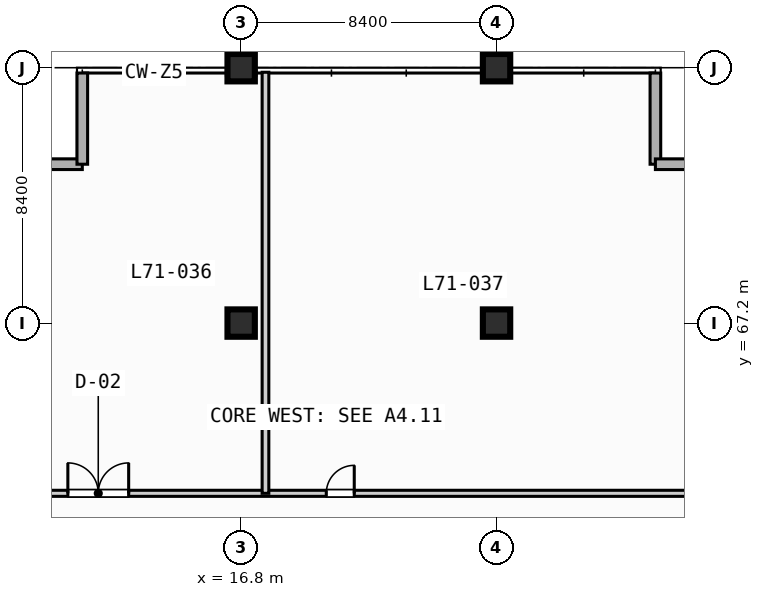
"""IFC4 building model, lengths in metres.
Left out: names, types, materials, properties, quantities, classifications, styles, units other than length and angle.
Written with IfcOpenShell. Run it as: python <this file> out.ifc"""

import sys

from ifc_helpers import new_model, si_unit, direction, frame, frame_2d, origin, origin_2d, place, context, subcontext, project, spatial, rectangle, extrude, element, fill, save


model = new_model("IFC4")
c1 = context("Model", 3, precision=1e-05, world=origin(), true_north=direction((0.0, 1.0)))
c2 = subcontext(c1, "Body", "Model", "MODEL_VIEW")
j1 = project(units=[si_unit("LENGTHUNIT", "METRE"), si_unit("PLANEANGLEUNIT", "RADIAN")], contexts=[c1])
p1 = place(None, origin())
s1 = spatial("IfcSite", under=j1, at=p1, CompositionType="ELEMENT")
p2 = place(p1, origin())
s2 = spatial("IfcBuilding", under=s1, at=p2, CompositionType="ELEMENT")
p3 = place(p2, frame((0.0, 0.0, 286.0)))
s3 = spatial("IfcBuildingStorey", under=s2, at=p3, CompositionType="ELEMENT", Elevation=286.0)
for number, where, z_axis, x_axis in (
    (1, (16.8, 67.2, 0.0), (0.0, 0.0, 1.0), (1.0, 0.0, 0.0)),
    (2, (16.8, 75.6, 0.0), (0.0, 0.0, 1.0), (1.0, 0.0, 0.0)),
    (3, (25.2, 67.2, 0.0), (0.0, 0.0, 1.0), (1.0, 0.0, 0.0)),
    (4, (25.2, 75.6, 0.0), (0.0, 0.0, 1.0), (1.0, 0.0, 0.0)),
):
    element("IfcColumn", number, at=place(p3, frame(where, z_axis=z_axis, x_axis=x_axis)), inside=s3, PredefinedType="COLUMN", context=c2, shape_type="SweptSolid", body=[
        extrude(rectangle(XDim=0.9, YDim=0.9, at=origin_2d()), origin(), (0.0, 0.0, 1.0), 4.4),
    ])
for number, where, z_axis, x_axis in (
    (5, (8.575, 72.425, 0.0), (0.0, 0.0, 1.0), (1.0, 0.0, 0.0)),
    (6, (11.575, 72.425, 0.0), (0.0, 0.0, 1.0), (0.0, 1.0, 0.0)),
    (7, (30.425, 75.425, 0.0), (0.0, 0.0, 1.0), (0.0, -1.0, 0.0)),
    (8, (30.425, 72.425, 0.0), (0.0, 0.0, 1.0), (1.0, 0.0, 0.0)),
):
    element("IfcWall", number, at=place(p3, frame(where, z_axis=z_axis, x_axis=x_axis)), inside=s3, PredefinedType="STANDARD", context=c2, shape_type="SweptSolid", body=[
        extrude(rectangle(XDim=3.0, YDim=0.35, at=frame_2d((1.5, 0.0))), origin(), (0.0, 0.0, 1.0), 4.17),
    ])
p4 = place(p3, frame((8.7, 61.6, 0.0), z_axis=(0.0, 0.0, 1.0), x_axis=(1.0, 0.0, 0.0)))
e9 = element("IfcWall", 9, at=p4, inside=s3, PredefinedType="PARTITIONING", context=c2, shape_type="SweptSolid", body=[
    extrude(rectangle(XDim=24.6, YDim=0.2, at=frame_2d((12.3, 0.0))), origin(), (0.0, 0.0, 1.0), 4.17),
])
p5 = place(p4, frame((2.4, 0.0, 0.0)))
e10 = element("IfcOpeningElement", 10, at=p5, cuts=e9, PredefinedType="OPENING", context=c2, shape_type="SweptSolid", body=[
    extrude(rectangle(XDim=2.0, YDim=2.15, at=frame_2d((1.0, 1.075))), frame((0.0, 0.11, 0.0), z_axis=(0.0, -1.0, 0.0), x_axis=(1.0, 0.0, 0.0)), (0.0, 0.0, 1.0), 0.22),
])
p6 = place(p4, frame((10.9, 0.0, 0.0)))
e11 = element("IfcOpeningElement", 11, at=p6, cuts=e9, PredefinedType="OPENING", context=c2, shape_type="SweptSolid", body=[
    extrude(rectangle(XDim=0.92, YDim=2.1, at=frame_2d((0.46, 1.05))), frame((0.0, 0.11, 0.0), z_axis=(0.0, -1.0, 0.0), x_axis=(1.0, 0.0, 0.0)), (0.0, 0.0, 1.0), 0.22),
])
p7 = place(p3, frame((17.6, 61.6, 0.0), z_axis=(0.0, 0.0, 1.0), x_axis=(0.0, 1.0, 0.0)))
e12 = element("IfcWall", 12, at=p7, inside=s3, PredefinedType="PARTITIONING", context=c2, shape_type="SweptSolid", body=[
    extrude(rectangle(XDim=13.85, YDim=0.22, at=frame_2d((6.925, 0.0))), origin(), (0.0, 0.0, 1.0), 4.17),
])
p8 = place(p5, origin())
e13 = element("IfcDoor", 13, at=p8, inside=s3, OperationType="SINGLE_SWING_LEFT", PredefinedType="DOOR", context=c2, shape_type="SweptSolid", body=[
    extrude(rectangle(XDim=2.0, YDim=2.15, at=frame_2d((1.0, 1.075))), frame((0.0, 0.025, 0.0), z_axis=(0.0, -1.0, 0.0), x_axis=(1.0, 0.0, 0.0)), (0.0, 0.0, 1.0), 0.05),
])
fill(e10, e13)
p9 = place(p6, origin())
e14 = element("IfcDoor", 14, at=p9, inside=s3, OperationType="SINGLE_SWING_RIGHT", PredefinedType="DOOR", context=c2, shape_type="SweptSolid", body=[
    extrude(rectangle(XDim=0.92, YDim=2.1, at=frame_2d((0.46, 1.05))), frame((0.0, 0.025, 0.0), z_axis=(0.0, -1.0, 0.0), x_axis=(1.0, 0.0, 0.0)), (0.0, 0.0, 1.0), 0.05),
])
fill(e11, e14)
save(model, sys.argv[1])
